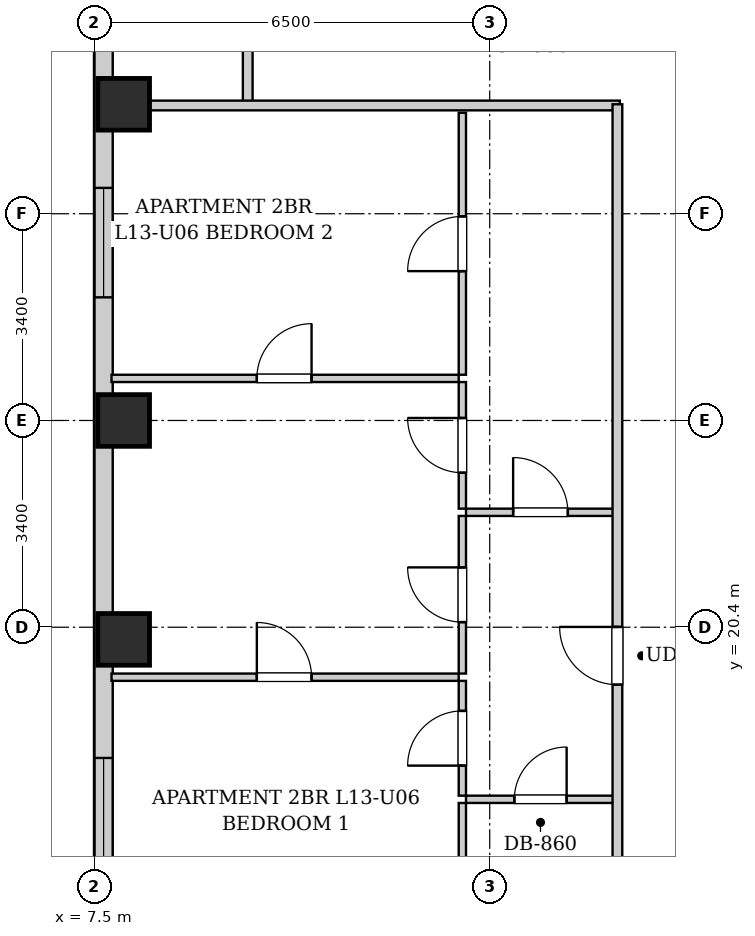
"""IFC4 building model, lengths in metres.
Left out: names, types, materials, properties, quantities, classifications, styles, units other than length and angle.
Written with IfcOpenShell. Run it as: python <this file> out.ifc"""

import sys

from ifc_helpers import new_model, si_unit, direction, frame, frame_2d, origin, origin_2d, place, context, subcontext, project, spatial, rectangle, extrude, element, fill, save


model = new_model("IFC4")
c1 = context("Model", 3, precision=1e-05, world=origin(), true_north=direction((0.0, 1.0)))
c2 = subcontext(c1, "Body", "Model", "MODEL_VIEW")
j1 = project(units=[si_unit("LENGTHUNIT", "METRE"), si_unit("PLANEANGLEUNIT", "RADIAN")], contexts=[c1])
p1 = place(None, origin())
s1 = spatial("IfcSite", under=j1, at=p1, CompositionType="ELEMENT")
p2 = place(p1, origin())
s2 = spatial("IfcBuilding", under=s1, at=p2, CompositionType="ELEMENT")
p3 = place(p2, frame((0.0, 0.0, 51.4)))
s3 = spatial("IfcBuildingStorey", under=s2, at=p3, CompositionType="ELEMENT", Elevation=51.4)
for number, where, z_axis, x_axis in (
    (1, (7.98, 20.2, 0.0), (0.0, 0.0, 1.0), (1.0, 0.0, 0.0)),
    (2, (7.98, 23.8, 0.0), (0.0, 0.0, 1.0), (1.0, 0.0, 0.0)),
    (3, (7.98, 29.0, 0.0), (0.0, 0.0, 1.0), (1.0, 0.0, 0.0)),
):
    element("IfcColumn", number, at=place(p3, frame(where, z_axis=z_axis, x_axis=x_axis)), inside=s3, PredefinedType="COLUMN", context=c2, shape_type="SweptSolid", body=[
        extrude(rectangle(XDim=0.85, YDim=0.85, at=origin_2d()), origin(), (0.0, 0.0, 1.0), 3.2),
    ])
p4 = place(p3, frame((7.65, 2.5, 0.0), z_axis=(0.0, 0.0, 1.0), x_axis=(0.0, 1.0, 0.0)))
e4 = element("IfcWall", 4, at=p4, inside=s3, PredefinedType="SOLIDWALL", context=c2, shape_type="SweptSolid", body=[
    extrude(rectangle(XDim=42.6, YDim=0.3, at=frame_2d((21.3, 0.0))), origin(), (0.0, 0.0, 1.0), 1.975),
])
p5 = place(p4, frame((3.15, 0.0, 0.55)))
e5 = element("IfcOpeningElement", 5, at=p5, cuts=e4, PredefinedType="OPENING", context=c2, shape_type="SweptSolid", body=[
    extrude(rectangle(XDim=1.8, YDim=1.2, at=frame_2d((0.9, 0.6))), frame((0.0, 0.16, 0.0), z_axis=(0.0, -1.0, 0.0), x_axis=(1.0, 0.0, 0.0)), (0.0, 0.0, 1.0), 0.32),
])
p6 = place(p4, frame((1.185, 0.0, 0.55)))
e6 = element("IfcOpeningElement", 6, at=p6, cuts=e4, PredefinedType="OPENING", context=c2, shape_type="SweptSolid", body=[
    extrude(rectangle(XDim=1.35, YDim=1.2, at=frame_2d((0.675, 0.6))), frame((0.0, 0.16, 0.0), z_axis=(0.0, -1.0, 0.0), x_axis=(1.0, 0.0, 0.0)), (0.0, 0.0, 1.0), 0.32),
])
p7 = place(p4, frame((37.085, 0.0, 0.55)))
e7 = element("IfcOpeningElement", 7, at=p7, cuts=e4, PredefinedType="OPENING", context=c2, shape_type="SweptSolid", body=[
    extrude(rectangle(XDim=1.8, YDim=1.2, at=frame_2d((0.9, 0.6))), frame((0.0, 0.16, 0.0), z_axis=(0.0, -1.0, 0.0), x_axis=(1.0, 0.0, 0.0)), (0.0, 0.0, 1.0), 0.32),
])
p8 = place(p4, frame((31.55, 0.0, 0.55)))
e8 = element("IfcOpeningElement", 8, at=p8, cuts=e4, PredefinedType="OPENING", context=c2, shape_type="SweptSolid", body=[
    extrude(rectangle(XDim=1.35, YDim=1.2, at=frame_2d((0.675, 0.6))), frame((0.0, 0.16, 0.0), z_axis=(0.0, -1.0, 0.0), x_axis=(1.0, 0.0, 0.0)), (0.0, 0.0, 1.0), 0.32),
])
p9 = place(p4, frame((13.95, 0.0, 0.55)))
e9 = element("IfcOpeningElement", 9, at=p9, cuts=e4, PredefinedType="OPENING", context=c2, shape_type="SweptSolid", body=[
    extrude(rectangle(XDim=1.8, YDim=1.2, at=frame_2d((0.9, 0.6))), frame((0.0, 0.16, 0.0), z_axis=(0.0, -1.0, 0.0), x_axis=(1.0, 0.0, 0.0)), (0.0, 0.0, 1.0), 0.32),
])
p10 = place(p4, frame((23.325, 0.0, 0.55)))
e10 = element("IfcOpeningElement", 10, at=p10, cuts=e4, PredefinedType="OPENING", context=c2, shape_type="SweptSolid", body=[
    extrude(rectangle(XDim=1.8, YDim=1.2, at=frame_2d((0.9, 0.6))), frame((0.0, 0.16, 0.0), z_axis=(0.0, -1.0, 0.0), x_axis=(1.0, 0.0, 0.0)), (0.0, 0.0, 1.0), 0.32),
])
p11 = place(p3, frame((10.02, 28.98, 0.0), z_axis=(0.0, 0.0, 1.0), x_axis=(0.0, 1.0, 0.0)))
e11 = element("IfcWall", 11, at=p11, inside=s3, PredefinedType="PARTITIONING", context=c2, shape_type="SweptSolid", body=[
    extrude(rectangle(XDim=1.74, YDim=0.16, at=frame_2d((0.87, 0.0))), origin(), (0.0, 0.0, 1.0), 2.94),
])
p12 = place(p3, frame((7.78, 28.98, 0.0), z_axis=(0.0, 0.0, 1.0), x_axis=(1.0, 0.0, 0.0)))
e12 = element("IfcWall", 12, at=p12, inside=s3, PredefinedType="PARTITIONING", context=c2, shape_type="SweptSolid", body=[
    extrude(rectangle(XDim=8.36, YDim=0.16, at=frame_2d((4.18, 0.0))), origin(), (0.0, 0.0, 1.0), 2.232),
])
p13 = place(p3, frame((13.61, 22.29, 0.0), z_axis=(0.0, 0.0, 1.0), x_axis=(1.0, 0.0, 0.0)))
e13 = element("IfcWall", 13, at=p13, inside=s3, PredefinedType="PARTITIONING", context=c2, shape_type="SweptSolid", body=[
    extrude(rectangle(XDim=2.45, YDim=0.12, at=frame_2d((1.225, 0.0))), origin(), (0.0, 0.0, 1.0), 2.94),
])
p14 = place(p13, frame((0.775, 0.0, 0.0)))
e14 = element("IfcOpeningElement", 14, at=p14, cuts=e13, PredefinedType="OPENING", context=c2, shape_type="SweptSolid", body=[
    extrude(rectangle(XDim=0.9, YDim=2.05, at=frame_2d((0.45, 1.025))), frame((0.0, 0.07, 0.0), z_axis=(0.0, -1.0, 0.0), x_axis=(1.0, 0.0, 0.0)), (0.0, 0.0, 1.0), 0.14),
])
p15 = place(p3, frame((13.55, 22.35, 0.0), z_axis=(0.0, 0.0, 1.0), x_axis=(0.0, 1.0, 0.0)))
e15 = element("IfcWall", 15, at=p15, inside=s3, PredefinedType="PARTITIONING", context=c2, shape_type="SweptSolid", body=[
    extrude(rectangle(XDim=2.082, YDim=0.12, at=frame_2d((1.041, 0.0))), origin(), (0.0, 0.0, 1.0), 2.94),
])
p16 = place(p15, frame((0.591, 0.0, 0.0)))
e16 = element("IfcOpeningElement", 16, at=p16, cuts=e15, PredefinedType="OPENING", context=c2, shape_type="SweptSolid", body=[
    extrude(rectangle(XDim=0.9, YDim=2.05, at=frame_2d((0.45, 1.025))), frame((0.0, 0.07, 0.0), z_axis=(0.0, -1.0, 0.0), x_axis=(1.0, 0.0, 0.0)), (0.0, 0.0, 1.0), 0.14),
])
p17 = place(p3, frame((13.55, 24.552, 0.0), z_axis=(0.0, 0.0, 1.0), x_axis=(0.0, 1.0, 0.0)))
e17 = element("IfcWall", 17, at=p17, inside=s3, PredefinedType="PARTITIONING", context=c2, shape_type="SweptSolid", body=[
    extrude(rectangle(XDim=4.308, YDim=0.12, at=frame_2d((2.154, 0.0))), origin(), (0.0, 0.0, 1.0), 2.94),
])
p18 = place(p17, frame((1.704, 0.0, 0.0)))
e18 = element("IfcOpeningElement", 18, at=p18, cuts=e17, PredefinedType="OPENING", context=c2, shape_type="SweptSolid", body=[
    extrude(rectangle(XDim=0.9, YDim=2.05, at=frame_2d((0.45, 1.025))), frame((0.0, 0.07, 0.0), z_axis=(0.0, -1.0, 0.0), x_axis=(1.0, 0.0, 0.0)), (0.0, 0.0, 1.0), 0.14),
])
p19 = place(p3, frame((13.61, 17.57, 0.0), z_axis=(0.0, 0.0, 1.0), x_axis=(1.0, 0.0, 0.0)))
e19 = element("IfcWall", 19, at=p19, inside=s3, PredefinedType="PARTITIONING", context=c2, shape_type="SweptSolid", body=[
    extrude(rectangle(XDim=2.45, YDim=0.12, at=frame_2d((1.225, 0.0))), origin(), (0.0, 0.0, 1.0), 2.94),
])
p20 = place(p19, frame((0.795, 0.0, 0.0)))
e20 = element("IfcOpeningElement", 20, at=p20, cuts=e19, PredefinedType="OPENING", context=c2, shape_type="SweptSolid", body=[
    extrude(rectangle(XDim=0.86, YDim=2.05, at=frame_2d((0.43, 1.025))), frame((0.0, 0.07, 0.0), z_axis=(0.0, -1.0, 0.0), x_axis=(1.0, 0.0, 0.0)), (0.0, 0.0, 1.0), 0.14),
])
p21 = place(p3, frame((13.55, 15.21, 0.0), z_axis=(0.0, 0.0, 1.0), x_axis=(0.0, 1.0, 0.0)))
e21 = element("IfcWall", 21, at=p21, inside=s3, PredefinedType="PARTITIONING", context=c2, shape_type="SweptSolid", body=[
    extrude(rectangle(XDim=2.3, YDim=0.12, at=frame_2d((1.15, 0.0))), origin(), (0.0, 0.0, 1.0), 2.94),
])
p22 = place(p3, frame((13.55, 17.63, 0.0), z_axis=(0.0, 0.0, 1.0), x_axis=(0.0, 1.0, 0.0)))
e22 = element("IfcWall", 22, at=p22, inside=s3, PredefinedType="PARTITIONING", context=c2, shape_type="SweptSolid", body=[
    extrude(rectangle(XDim=1.888, YDim=0.12, at=frame_2d((0.944, 0.0))), origin(), (0.0, 0.0, 1.0), 2.94),
])
p23 = place(p22, frame((0.494, 0.0, 0.0)))
e23 = element("IfcOpeningElement", 23, at=p23, cuts=e22, PredefinedType="OPENING", context=c2, shape_type="SweptSolid", body=[
    extrude(rectangle(XDim=0.9, YDim=2.05, at=frame_2d((0.45, 1.025))), frame((0.0, 0.07, 0.0), z_axis=(0.0, -1.0, 0.0), x_axis=(1.0, 0.0, 0.0)), (0.0, 0.0, 1.0), 0.14),
])
p24 = place(p3, frame((13.55, 19.638, 0.0), z_axis=(0.0, 0.0, 1.0), x_axis=(0.0, 1.0, 0.0)))
e24 = element("IfcWall", 24, at=p24, inside=s3, PredefinedType="PARTITIONING", context=c2, shape_type="SweptSolid", body=[
    extrude(rectangle(XDim=2.592, YDim=0.12, at=frame_2d((1.296, 0.0))), origin(), (0.0, 0.0, 1.0), 2.94),
])
p25 = place(p24, frame((0.846, 0.0, 0.0)))
e25 = element("IfcOpeningElement", 25, at=p25, cuts=e24, PredefinedType="OPENING", context=c2, shape_type="SweptSolid", body=[
    extrude(rectangle(XDim=0.9, YDim=2.05, at=frame_2d((0.45, 1.025))), frame((0.0, 0.07, 0.0), z_axis=(0.0, -1.0, 0.0), x_axis=(1.0, 0.0, 0.0)), (0.0, 0.0, 1.0), 0.14),
])
p26 = place(p3, frame((7.78, 19.578, 0.0), z_axis=(0.0, 0.0, 1.0), x_axis=(1.0, 0.0, 0.0)))
e26 = element("IfcWall", 26, at=p26, inside=s3, PredefinedType="PARTITIONING", context=c2, shape_type="SweptSolid", body=[
    extrude(rectangle(XDim=5.71, YDim=0.12, at=frame_2d((2.855, 0.0))), origin(), (0.0, 0.0, 1.0), 2.94),
])
p27 = place(p26, frame((2.39, 0.0, 0.0)))
e27 = element("IfcOpeningElement", 27, at=p27, cuts=e26, PredefinedType="OPENING", context=c2, shape_type="SweptSolid", body=[
    extrude(rectangle(XDim=0.9, YDim=2.05, at=frame_2d((0.45, 1.025))), frame((0.0, 0.07, 0.0), z_axis=(0.0, -1.0, 0.0), x_axis=(1.0, 0.0, 0.0)), (0.0, 0.0, 1.0), 0.14),
])
p28 = place(p3, frame((7.78, 24.492, 0.0), z_axis=(0.0, 0.0, 1.0), x_axis=(1.0, 0.0, 0.0)))
e28 = element("IfcWall", 28, at=p28, inside=s3, PredefinedType="PARTITIONING", context=c2, shape_type="SweptSolid", body=[
    extrude(rectangle(XDim=5.71, YDim=0.12, at=frame_2d((2.855, 0.0))), origin(), (0.0, 0.0, 1.0), 2.508),
])
p29 = place(p28, frame((2.39, 0.0, 0.0)))
e29 = element("IfcOpeningElement", 29, at=p29, cuts=e28, PredefinedType="OPENING", context=c2, shape_type="SweptSolid", body=[
    extrude(rectangle(XDim=0.9, YDim=2.05, at=frame_2d((0.45, 1.025))), frame((0.0, 0.07, 0.0), z_axis=(0.0, -1.0, 0.0), x_axis=(1.0, 0.0, 0.0)), (0.0, 0.0, 1.0), 0.14),
])
p30 = place(p3, frame((16.1, 15.07, 0.0), z_axis=(0.0, 0.0, 1.0), x_axis=(0.0, 1.0, 0.0)))
e30 = element("IfcWall", 30, at=p30, inside=s3, PredefinedType="PARTITIONING", context=c2, shape_type="SweptSolid", body=[
    extrude(rectangle(XDim=13.93, YDim=0.16, at=frame_2d((6.965, 0.0))), origin(), (0.0, 0.0, 1.0), 2.94),
])
p31 = place(p30, frame((4.385, 0.0, 0.0)))
e31 = element("IfcOpeningElement", 31, at=p31, cuts=e30, PredefinedType="OPENING", context=c2, shape_type="SweptSolid", body=[
    extrude(rectangle(XDim=0.95, YDim=2.1, at=frame_2d((0.475, 1.05))), frame((0.0, 0.09, 0.0), z_axis=(0.0, -1.0, 0.0), x_axis=(1.0, 0.0, 0.0)), (0.0, 0.0, 1.0), 0.18),
])
p32 = place(p14, origin())
e32 = element("IfcDoor", 32, at=p32, inside=s3, OperationType="SINGLE_SWING_LEFT", PredefinedType="DOOR", context=c2, shape_type="SweptSolid", body=[
    extrude(rectangle(XDim=0.9, YDim=2.05, at=frame_2d((0.45, 1.025))), frame((0.0, 0.025, 0.0), z_axis=(0.0, -1.0, 0.0), x_axis=(1.0, 0.0, 0.0)), (0.0, 0.0, 1.0), 0.05),
])
fill(e14, e32)
p33 = place(p16, origin())
e33 = element("IfcDoor", 33, at=p33, inside=s3, OperationType="SINGLE_SWING_RIGHT", PredefinedType="DOOR", context=c2, shape_type="SweptSolid", body=[
    extrude(rectangle(XDim=0.9, YDim=2.05, at=frame_2d((0.45, 1.025))), frame((0.0, 0.025, 0.0), z_axis=(0.0, -1.0, 0.0), x_axis=(1.0, 0.0, 0.0)), (0.0, 0.0, 1.0), 0.05),
])
fill(e16, e33)
p34 = place(p18, origin())
e34 = element("IfcDoor", 34, at=p34, inside=s3, OperationType="SINGLE_SWING_LEFT", PredefinedType="DOOR", context=c2, shape_type="SweptSolid", body=[
    extrude(rectangle(XDim=0.9, YDim=2.05, at=frame_2d((0.45, 1.025))), frame((0.0, 0.025, 0.0), z_axis=(0.0, -1.0, 0.0), x_axis=(1.0, 0.0, 0.0)), (0.0, 0.0, 1.0), 0.05),
])
fill(e18, e34)
p35 = place(p20, origin())
e35 = element("IfcDoor", 35, at=p35, inside=s3, OperationType="SINGLE_SWING_RIGHT", PredefinedType="DOOR", context=c2, shape_type="SweptSolid", body=[
    extrude(rectangle(XDim=0.86, YDim=2.05, at=frame_2d((0.43, 1.025))), frame((0.0, 0.025, 0.0), z_axis=(0.0, -1.0, 0.0), x_axis=(1.0, 0.0, 0.0)), (0.0, 0.0, 1.0), 0.05),
])
fill(e20, e35)
p36 = place(p23, origin())
e36 = element("IfcDoor", 36, at=p36, inside=s3, OperationType="SINGLE_SWING_LEFT", PredefinedType="DOOR", context=c2, shape_type="SweptSolid", body=[
    extrude(rectangle(XDim=0.9, YDim=2.05, at=frame_2d((0.45, 1.025))), frame((0.0, 0.025, 0.0), z_axis=(0.0, -1.0, 0.0), x_axis=(1.0, 0.0, 0.0)), (0.0, 0.0, 1.0), 0.05),
])
fill(e23, e36)
p37 = place(p25, origin())
e37 = element("IfcDoor", 37, at=p37, inside=s3, OperationType="SINGLE_SWING_RIGHT", PredefinedType="DOOR", context=c2, shape_type="SweptSolid", body=[
    extrude(rectangle(XDim=0.9, YDim=2.05, at=frame_2d((0.45, 1.025))), frame((0.0, 0.025, 0.0), z_axis=(0.0, -1.0, 0.0), x_axis=(1.0, 0.0, 0.0)), (0.0, 0.0, 1.0), 0.05),
])
fill(e25, e37)
p38 = place(p27, origin())
e38 = element("IfcDoor", 38, at=p38, inside=s3, OperationType="SINGLE_SWING_LEFT", PredefinedType="DOOR", context=c2, shape_type="SweptSolid", body=[
    extrude(rectangle(XDim=0.9, YDim=2.05, at=frame_2d((0.45, 1.025))), frame((0.0, 0.025, 0.0), z_axis=(0.0, -1.0, 0.0), x_axis=(1.0, 0.0, 0.0)), (0.0, 0.0, 1.0), 0.05),
])
fill(e27, e38)
p39 = place(p29, origin())
e39 = element("IfcDoor", 39, at=p39, inside=s3, OperationType="SINGLE_SWING_RIGHT", PredefinedType="DOOR", context=c2, shape_type="SweptSolid", body=[
    extrude(rectangle(XDim=0.9, YDim=2.05, at=frame_2d((0.45, 1.025))), frame((0.0, 0.025, 0.0), z_axis=(0.0, -1.0, 0.0), x_axis=(1.0, 0.0, 0.0)), (0.0, 0.0, 1.0), 0.05),
])
fill(e29, e39)
p40 = place(p31, origin())
e40 = element("IfcDoor", 40, at=p40, inside=s3, OperationType="SINGLE_SWING_RIGHT", PredefinedType="DOOR", context=c2, shape_type="SweptSolid", body=[
    extrude(rectangle(XDim=0.95, YDim=2.1, at=frame_2d((0.475, 1.05))), frame((0.0, 0.025, 0.0), z_axis=(0.0, -1.0, 0.0), x_axis=(1.0, 0.0, 0.0)), (0.0, 0.0, 1.0), 0.05),
])
fill(e31, e40)
p41 = place(p9, origin())
e41 = element("IfcWindow", 41, at=p41, inside=s3, PartitioningType="DOUBLE_PANEL_VERTICAL", PredefinedType="WINDOW", context=c2, shape_type="SweptSolid", body=[
    extrude(rectangle(XDim=1.8, YDim=1.2, at=frame_2d((0.9, 0.6))), frame((0.0, 0.03, 0.0), z_axis=(0.0, -1.0, 0.0), x_axis=(1.0, 0.0, 0.0)), (0.0, 0.0, 1.0), 0.06),
])
fill(e9, e41)
p42 = place(p10, origin())
e42 = element("IfcWindow", 42, at=p42, inside=s3, PartitioningType="DOUBLE_PANEL_VERTICAL", PredefinedType="WINDOW", context=c2, shape_type="SweptSolid", body=[
    extrude(rectangle(XDim=1.8, YDim=1.2, at=frame_2d((0.9, 0.6))), frame((0.0, 0.03, 0.0), z_axis=(0.0, -1.0, 0.0), x_axis=(1.0, 0.0, 0.0)), (0.0, 0.0, 1.0), 0.06),
])
fill(e10, e42)
save(model, sys.argv[1])
